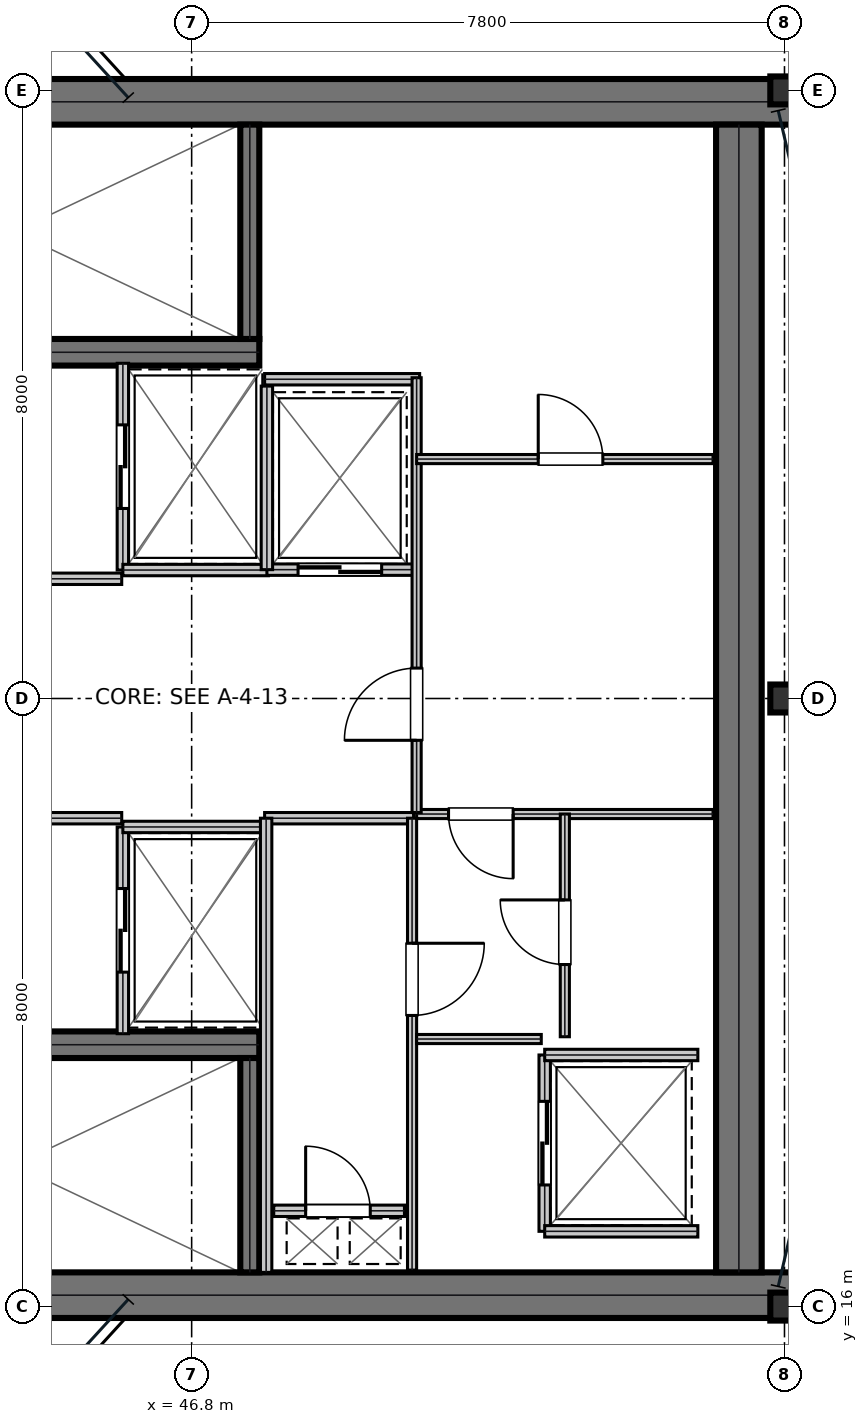
"""IFC4 building model, lengths in metres.
Left out: names, types, materials, properties, quantities, classifications, styles, units other than length and angle.
Written with IfcOpenShell. Run it as: python <this file> out.ifc"""

import sys

from ifc_helpers import new_model, si_unit, direction, frame, frame_2d, origin, origin_2d, place, context, subcontext, project, spatial, rectangle, i_section, extrude, element, fill, save


model = new_model("IFC4")
c1 = context("Model", 3, precision=1e-05, world=origin(), true_north=direction((0.0, 1.0)))
c2 = subcontext(c1, "Body", "Model", "MODEL_VIEW")
j1 = project(units=[si_unit("LENGTHUNIT", "METRE"), si_unit("PLANEANGLEUNIT", "RADIAN")], contexts=[c1])
p1 = place(None, origin())
s1 = spatial("IfcSite", under=j1, at=p1, CompositionType="ELEMENT")
p2 = place(p1, origin())
s2 = spatial("IfcBuilding", under=s1, at=p2, CompositionType="ELEMENT")
p3 = place(p2, frame((0.0, 0.0, 287.1)))
s3 = spatial("IfcBuildingStorey", under=s2, at=p3, CompositionType="ELEMENT", Elevation=287.1)
for number, where, z_axis, x_axis in (
    (1, (38.8, 31.85, 0.0), (0.0, 0.0, 1.0), (1.0, 0.0, 0.0)),
    (2, (38.8, 16.15, 0.0), (0.0, 0.0, 1.0), (1.0, 0.0, 0.0)),
):
    element("IfcWall", number, at=place(p3, frame(where, z_axis=z_axis, x_axis=x_axis)), inside=s3, PredefinedType="SHEAR", context=c2, shape_type="SweptSolid", body=[
        extrude(rectangle(XDim=16.0, YDim=0.6, at=frame_2d((8.0, 0.0))), origin(), (0.0, 0.0, 1.0), 3.81),
    ])
p4 = place(p3, frame((54.0, 16.45, 0.0), z_axis=(0.0, 0.0, 1.0), x_axis=(0.0, 1.0, 0.0)))
e3 = element("IfcWall", 3, at=p4, inside=s3, PredefinedType="SHEAR", context=c2, shape_type="SweptSolid", body=[
    extrude(rectangle(XDim=15.1, YDim=0.6, at=frame_2d((7.55, 0.0))), origin(), (0.0, 0.0, 1.0), 3.81),
])
p5 = place(p3, frame((39.98, 28.555, 0.0), z_axis=(0.0, 0.0, 1.0), x_axis=(1.0, 0.0, 0.0)))
e4 = element("IfcWall", 4, at=p5, inside=s3, PredefinedType="SHEAR", context=c2, shape_type="SweptSolid", body=[
    extrude(rectangle(XDim=7.71, YDim=0.35, at=frame_2d((3.855, 0.0))), origin(), (0.0, 0.0, 1.0), 3.81),
])
p6 = place(p5, frame((0.25, 0.0, 0.0)))
e5 = element("IfcOpeningElement", 5, at=p6, cuts=e4, PredefinedType="OPENING", context=c2, shape_type="SweptSolid", body=[
    extrude(rectangle(XDim=1.1, YDim=2.15, at=frame_2d((0.55, 1.075))), frame((0.0, 0.185, 0.0), z_axis=(0.0, -1.0, 0.0), x_axis=(1.0, 0.0, 0.0)), (0.0, 0.0, 1.0), 0.37),
])
p7 = place(p3, frame((39.98, 19.445, 0.0), z_axis=(0.0, 0.0, 1.0), x_axis=(1.0, 0.0, 0.0)))
e6 = element("IfcWall", 6, at=p7, inside=s3, PredefinedType="SHEAR", context=c2, shape_type="SweptSolid", body=[
    extrude(rectangle(XDim=7.71, YDim=0.35, at=frame_2d((3.855, 0.0))), origin(), (0.0, 0.0, 1.0), 3.81),
])
p8 = place(p7, frame((0.25, 0.0, 0.0)))
e7 = element("IfcOpeningElement", 7, at=p8, cuts=e6, PredefinedType="OPENING", context=c2, shape_type="SweptSolid", body=[
    extrude(rectangle(XDim=1.1, YDim=2.15, at=frame_2d((0.55, 1.075))), frame((0.0, 0.185, 0.0), z_axis=(0.0, -1.0, 0.0), x_axis=(1.0, 0.0, 0.0)), (0.0, 0.0, 1.0), 0.37),
])
for number, where, z_axis, x_axis in (
    (8, (47.565, 28.73, 0.0), (0.0, 0.0, 1.0), (0.0, 1.0, 0.0)),
    (9, (47.565, 16.45, 0.0), (0.0, 0.0, 1.0), (0.0, 1.0, 0.0)),
):
    element("IfcWall", number, at=place(p3, frame(where, z_axis=z_axis, x_axis=x_axis)), inside=s3, PredefinedType="SHEAR", context=c2, shape_type="SweptSolid", body=[
        extrude(rectangle(XDim=2.82, YDim=0.25, at=frame_2d((1.41, 0.0))), origin(), (0.0, 0.0, 1.0), 3.81),
    ])
for number, where, z_axis, x_axis in (
    (10, (54.6, 16.0, 0.0), (0.0, 0.0, 1.0), (1.0, 0.0, 0.0)),
    (11, (54.6, 24.0, 0.0), (0.0, 0.0, 1.0), (1.0, 0.0, 0.0)),
    (12, (54.6, 32.0, 0.0), (0.0, 0.0, 1.0), (1.0, 0.0, 0.0)),
):
    element("IfcColumn", number, at=place(p3, frame(where, z_axis=z_axis, x_axis=x_axis)), inside=s3, PredefinedType="COLUMN", context=c2, shape_type="SweptSolid", body=[
        extrude(i_section(OverallWidth=0.373, OverallDepth=0.368, WebThickness=0.015, FlangeThickness=0.024, at=origin_2d()), origin(), (0.0, 0.0, 1.0), 4.044),
    ])
p9 = place(p3, frame((39.98, 25.575, 0.0), z_axis=(0.0, 0.0, 1.0), x_axis=(1.0, 0.0, 0.0)))
e13 = element("IfcWall", 13, at=p9, inside=s3, PredefinedType="PARTITIONING", context=c2, shape_type="SweptSolid", body=[
    extrude(rectangle(XDim=5.9, YDim=0.15, at=frame_2d((2.95, 0.0))), origin(), (0.0, 0.0, 1.0), 3.81),
])
p10 = place(p9, frame((2.35, 0.0, 0.0)))
e14 = element("IfcOpeningElement", 14, at=p10, cuts=e13, PredefinedType="OPENING", context=c2, shape_type="SweptSolid", body=[
    extrude(rectangle(XDim=1.05, YDim=2.15, at=frame_2d((0.525, 1.075))), frame((0.0, 0.085, 0.0), z_axis=(0.0, -1.0, 0.0), x_axis=(1.0, 0.0, 0.0)), (0.0, 0.0, 1.0), 0.17),
])
p11 = place(p3, frame((39.98, 22.425, 0.0), z_axis=(0.0, 0.0, 1.0), x_axis=(1.0, 0.0, 0.0)))
e15 = element("IfcWall", 15, at=p11, inside=s3, PredefinedType="PARTITIONING", context=c2, shape_type="SweptSolid", body=[
    extrude(rectangle(XDim=5.9, YDim=0.15, at=frame_2d((2.95, 0.0))), origin(), (0.0, 0.0, 1.0), 3.81),
])
p12 = place(p11, frame((2.35, 0.0, 0.0)))
e16 = element("IfcOpeningElement", 16, at=p12, cuts=e15, PredefinedType="OPENING", context=c2, shape_type="SweptSolid", body=[
    extrude(rectangle(XDim=1.05, YDim=2.15, at=frame_2d((0.525, 1.075))), frame((0.0, 0.085, 0.0), z_axis=(0.0, -1.0, 0.0), x_axis=(1.0, 0.0, 0.0)), (0.0, 0.0, 1.0), 0.17),
])
p13 = place(p3, frame((45.895, 25.69, 0.0), z_axis=(0.0, 0.0, 1.0), x_axis=(0.0, 1.0, 0.0)))
e17 = element("IfcWall", 17, at=p13, inside=s3, PredefinedType="PARTITIONING", context=c2, shape_type="SweptSolid", body=[
    extrude(rectangle(XDim=2.72, YDim=0.15, at=frame_2d((1.36, 0.0))), origin(), (0.0, 0.0, 1.0), 3.81),
])
p14 = place(p13, frame((0.81, 0.0, 0.0)))
e18 = element("IfcOpeningElement", 18, at=p14, cuts=e17, PredefinedType="OPENING", context=c2, shape_type="SweptSolid", body=[
    extrude(rectangle(XDim=1.1, YDim=2.15, at=frame_2d((0.55, 1.075))), frame((0.0, 0.085, 0.0), z_axis=(0.0, -1.0, 0.0), x_axis=(1.0, 0.0, 0.0)), (0.0, 0.0, 1.0), 0.17),
])
p15 = place(p3, frame((45.895, 25.69, 0.0), z_axis=(0.0, 0.0, 1.0), x_axis=(1.0, 0.0, 0.0)))
e19 = element("IfcWall", 19, at=p15, inside=s3, PredefinedType="PARTITIONING", context=c2, shape_type="SweptSolid", body=[
    extrude(rectangle(XDim=1.915, YDim=0.15, at=frame_2d((0.958, 0.0))), origin(), (0.0, 0.0, 1.0), 3.81),
])
p16 = place(p3, frame((45.895, 19.59, 0.0), z_axis=(0.0, 0.0, 1.0), x_axis=(0.0, 1.0, 0.0)))
e20 = element("IfcWall", 20, at=p16, inside=s3, PredefinedType="PARTITIONING", context=c2, shape_type="SweptSolid", body=[
    extrude(rectangle(XDim=2.72, YDim=0.15, at=frame_2d((1.36, 0.0))), origin(), (0.0, 0.0, 1.0), 3.81),
])
p17 = place(p16, frame((0.81, 0.0, 0.0)))
e21 = element("IfcOpeningElement", 21, at=p17, cuts=e20, PredefinedType="OPENING", context=c2, shape_type="SweptSolid", body=[
    extrude(rectangle(XDim=1.1, YDim=2.15, at=frame_2d((0.55, 1.075))), frame((0.0, 0.085, 0.0), z_axis=(0.0, -1.0, 0.0), x_axis=(1.0, 0.0, 0.0)), (0.0, 0.0, 1.0), 0.17),
])
p18 = place(p3, frame((45.895, 22.31, 0.0), z_axis=(0.0, 0.0, 1.0), x_axis=(1.0, 0.0, 0.0)))
e22 = element("IfcWall", 22, at=p18, inside=s3, PredefinedType="PARTITIONING", context=c2, shape_type="SweptSolid", body=[
    extrude(rectangle(XDim=1.915, YDim=0.15, at=frame_2d((0.958, 0.0))), origin(), (0.0, 0.0, 1.0), 3.81),
])
p19 = place(p3, frame((47.79, 25.695, 0.0), z_axis=(0.0, 0.0, 1.0), x_axis=(1.0, 0.0, 0.0)))
e23 = element("IfcWall", 23, at=p19, inside=s3, PredefinedType="PARTITIONING", context=c2, shape_type="SweptSolid", body=[
    extrude(rectangle(XDim=1.92, YDim=0.15, at=frame_2d((0.96, 0.0))), origin(), (0.0, 0.0, 1.0), 3.81),
])
p20 = place(p19, frame((0.41, 0.0, 0.0)))
e24 = element("IfcOpeningElement", 24, at=p20, cuts=e23, PredefinedType="OPENING", context=c2, shape_type="SweptSolid", body=[
    extrude(rectangle(XDim=1.1, YDim=2.15, at=frame_2d((0.55, 1.075))), frame((0.0, 0.085, 0.0), z_axis=(0.0, -1.0, 0.0), x_axis=(1.0, 0.0, 0.0)), (0.0, 0.0, 1.0), 0.17),
])
p21 = place(p3, frame((47.79, 25.695, 0.0), z_axis=(0.0, 0.0, 1.0), x_axis=(0.0, 1.0, 0.0)))
e25 = element("IfcWall", 25, at=p21, inside=s3, PredefinedType="PARTITIONING", context=c2, shape_type="SweptSolid", body=[
    extrude(rectangle(XDim=2.415, YDim=0.15, at=frame_2d((1.208, 0.0))), origin(), (0.0, 0.0, 1.0), 3.81),
])
p22 = place(p3, frame((51.445, 16.99, 0.0), z_axis=(0.0, 0.0, 1.0), x_axis=(0.0, 1.0, 0.0)))
e26 = element("IfcWall", 26, at=p22, inside=s3, PredefinedType="PARTITIONING", context=c2, shape_type="SweptSolid", body=[
    extrude(rectangle(XDim=2.32, YDim=0.15, at=frame_2d((1.16, 0.0))), origin(), (0.0, 0.0, 1.0), 3.81),
])
p23 = place(p22, frame((0.61, 0.0, 0.0)))
e27 = element("IfcOpeningElement", 27, at=p23, cuts=e26, PredefinedType="OPENING", context=c2, shape_type="SweptSolid", body=[
    extrude(rectangle(XDim=1.1, YDim=2.15, at=frame_2d((0.55, 1.075))), frame((0.0, 0.085, 0.0), z_axis=(0.0, -1.0, 0.0), x_axis=(1.0, 0.0, 0.0)), (0.0, 0.0, 1.0), 0.17),
])
for number, where, z_axis, x_axis in (
    (28, (51.445, 16.99, 0.0), (0.0, 0.0, 1.0), (1.0, 0.0, 0.0)),
    (29, (51.445, 19.31, 0.0), (0.0, 0.0, 1.0), (1.0, 0.0, 0.0)),
):
    element("IfcWall", number, at=place(p3, frame(where, z_axis=z_axis, x_axis=x_axis)), inside=s3, PredefinedType="PARTITIONING", context=c2, shape_type="SweptSolid", body=[
        extrude(rectangle(XDim=2.015, YDim=0.15, at=frame_2d((1.007, 0.0))), origin(), (0.0, 0.0, 1.0), 3.81),
    ])
p24 = place(p3, frame((47.88, 17.26, 0.0), z_axis=(0.0, 0.0, 1.0), x_axis=(1.0, 0.0, 0.0)))
e30 = element("IfcWall", 30, at=p24, inside=s3, PredefinedType="PARTITIONING", context=c2, shape_type="SweptSolid", body=[
    extrude(rectangle(XDim=1.72, YDim=0.15, at=frame_2d((0.86, 0.0))), origin(), (0.0, 0.0, 1.0), 3.81),
])
p25 = place(p24, frame((0.42, 0.0, 0.0)))
e31 = element("IfcOpeningElement", 31, at=p25, cuts=e30, PredefinedType="OPENING", context=c2, shape_type="SweptSolid", body=[
    extrude(rectangle(XDim=0.85, YDim=2.15, at=frame_2d((0.425, 1.075))), frame((0.0, 0.085, 0.0), z_axis=(0.0, -1.0, 0.0), x_axis=(1.0, 0.0, 0.0)), (0.0, 0.0, 1.0), 0.17),
])
p26 = place(p3, frame((47.76, 22.425, 0.0), z_axis=(0.0, 0.0, 1.0), x_axis=(1.0, 0.0, 0.0)))
e32 = element("IfcWall", 32, at=p26, inside=s3, PredefinedType="PARTITIONING", context=c2, shape_type="SweptSolid", body=[
    extrude(rectangle(XDim=1.96, YDim=0.15, at=frame_2d((0.98, 0.0))), origin(), (0.0, 0.0, 1.0), 3.81),
])
p27 = place(p3, frame((47.78, 16.45, 0.0), z_axis=(0.0, 0.0, 1.0), x_axis=(0.0, 1.0, 0.0)))
e33 = element("IfcWall", 33, at=p27, inside=s3, PredefinedType="PARTITIONING", context=c2, shape_type="SweptSolid", body=[
    extrude(rectangle(XDim=5.975, YDim=0.15, at=frame_2d((2.988, 0.0))), origin(), (0.0, 0.0, 1.0), 3.81),
])
p28 = place(p3, frame((49.7, 16.48, 0.0), z_axis=(0.0, 0.0, 1.0), x_axis=(0.0, 1.0, 0.0)))
e34 = element("IfcWall", 34, at=p28, inside=s3, PredefinedType="PARTITIONING", context=c2, shape_type="SweptSolid", body=[
    extrude(rectangle(XDim=5.945, YDim=0.12, at=frame_2d((2.973, 0.0))), origin(), (0.0, 0.0, 1.0), 3.81),
])
p29 = place(p28, frame((3.35, 0.0, 0.0)))
e35 = element("IfcOpeningElement", 35, at=p29, cuts=e34, PredefinedType="OPENING", context=c2, shape_type="SweptSolid", body=[
    extrude(rectangle(XDim=0.95, YDim=2.15, at=frame_2d((0.475, 1.075))), frame((0.0, 0.07, 0.0), z_axis=(0.0, -1.0, 0.0), x_axis=(1.0, 0.0, 0.0)), (0.0, 0.0, 1.0), 0.14),
])
p30 = place(p3, frame((49.76, 22.48, 0.0), z_axis=(0.0, 0.0, 1.0), x_axis=(1.0, 0.0, 0.0)))
e36 = element("IfcWall", 36, at=p30, inside=s3, PredefinedType="PARTITIONING", context=c2, shape_type="SweptSolid", body=[
    extrude(rectangle(XDim=3.9, YDim=0.12, at=frame_2d((1.95, 0.0))), origin(), (0.0, 0.0, 1.0), 3.81),
])
p31 = place(p30, frame((0.42, 0.0, 0.0)))
e37 = element("IfcOpeningElement", 37, at=p31, cuts=e36, PredefinedType="OPENING", context=c2, shape_type="SweptSolid", body=[
    extrude(rectangle(XDim=0.85, YDim=2.15, at=frame_2d((0.425, 1.075))), frame((0.0, 0.07, 0.0), z_axis=(0.0, -1.0, 0.0), x_axis=(1.0, 0.0, 0.0)), (0.0, 0.0, 1.0), 0.14),
])
p32 = place(p3, frame((51.71, 19.55, 0.0), z_axis=(0.0, 0.0, 1.0), x_axis=(0.0, 1.0, 0.0)))
e38 = element("IfcWall", 38, at=p32, inside=s3, PredefinedType="PARTITIONING", context=c2, shape_type="SweptSolid", body=[
    extrude(rectangle(XDim=2.93, YDim=0.12, at=frame_2d((1.465, 0.0))), origin(), (0.0, 0.0, 1.0), 3.81),
])
p33 = place(p32, frame((0.95, 0.0, 0.0)))
e39 = element("IfcOpeningElement", 39, at=p33, cuts=e38, PredefinedType="OPENING", context=c2, shape_type="SweptSolid", body=[
    extrude(rectangle(XDim=0.85, YDim=2.15, at=frame_2d((0.425, 1.075))), frame((0.0, 0.07, 0.0), z_axis=(0.0, -1.0, 0.0), x_axis=(1.0, 0.0, 0.0)), (0.0, 0.0, 1.0), 0.14),
])
p34 = place(p3, frame((49.76, 19.52, 0.0), z_axis=(0.0, 0.0, 1.0), x_axis=(1.0, 0.0, 0.0)))
e40 = element("IfcWall", 40, at=p34, inside=s3, PredefinedType="PARTITIONING", context=c2, shape_type="SweptSolid", body=[
    extrude(rectangle(XDim=1.64, YDim=0.12, at=frame_2d((0.82, 0.0))), origin(), (0.0, 0.0, 1.0), 3.81),
])
p35 = place(p3, frame((47.76, 28.2, 0.0), z_axis=(0.0, 0.0, 1.0), x_axis=(1.0, 0.0, 0.0)))
e41 = element("IfcWall", 41, at=p35, inside=s3, PredefinedType="PARTITIONING", context=c2, shape_type="SweptSolid", body=[
    extrude(rectangle(XDim=2.04, YDim=0.15, at=frame_2d((1.02, 0.0))), origin(), (0.0, 0.0, 1.0), 3.81),
])
p36 = place(p3, frame((49.76, 22.5, 0.0), z_axis=(0.0, 0.0, 1.0), x_axis=(0.0, 1.0, 0.0)))
e42 = element("IfcWall", 42, at=p36, inside=s3, PredefinedType="PARTITIONING", context=c2, shape_type="SweptSolid", body=[
    extrude(rectangle(XDim=5.72, YDim=0.12, at=frame_2d((2.86, 0.0))), origin(), (0.0, 0.0, 1.0), 3.81),
])
p37 = place(p36, frame((0.95, 0.0, 0.0)))
e43 = element("IfcOpeningElement", 43, at=p37, cuts=e42, PredefinedType="OPENING", context=c2, shape_type="SweptSolid", body=[
    extrude(rectangle(XDim=0.95, YDim=2.15, at=frame_2d((0.475, 1.075))), frame((0.0, 0.07, 0.0), z_axis=(0.0, -1.0, 0.0), x_axis=(1.0, 0.0, 0.0)), (0.0, 0.0, 1.0), 0.14),
])
p38 = place(p3, frame((49.76, 27.15, 0.0), z_axis=(0.0, 0.0, 1.0), x_axis=(1.0, 0.0, 0.0)))
e44 = element("IfcWall", 44, at=p38, inside=s3, PredefinedType="PARTITIONING", context=c2, shape_type="SweptSolid", body=[
    extrude(rectangle(XDim=3.9, YDim=0.12, at=frame_2d((1.95, 0.0))), origin(), (0.0, 0.0, 1.0), 3.81),
])
p39 = place(p38, frame((1.6, 0.0, 0.0)))
e45 = element("IfcOpeningElement", 45, at=p39, cuts=e44, PredefinedType="OPENING", context=c2, shape_type="SweptSolid", body=[
    extrude(rectangle(XDim=0.85, YDim=2.15, at=frame_2d((0.425, 1.075))), frame((0.0, 0.07, 0.0), z_axis=(0.0, -1.0, 0.0), x_axis=(1.0, 0.0, 0.0)), (0.0, 0.0, 1.0), 0.14),
])
p40 = place(p14, frame((1.1, 0.0, 0.0), z_axis=(0.0, 0.0, 1.0), x_axis=(-1.0, 0.0, 0.0)))
e46 = element("IfcDoor", 46, at=p40, inside=s3, OperationType="DOUBLE_DOOR_SLIDING", PredefinedType="DOOR", context=c2, shape_type="SweptSolid", body=[
    extrude(rectangle(XDim=1.1, YDim=2.15, at=frame_2d((0.55, 1.075))), frame((0.0, 0.025, 0.0), z_axis=(0.0, -1.0, 0.0), x_axis=(1.0, 0.0, 0.0)), (0.0, 0.0, 1.0), 0.05),
])
fill(e18, e46)
p41 = place(p17, frame((1.1, 0.0, 0.0), z_axis=(0.0, 0.0, 1.0), x_axis=(-1.0, 0.0, 0.0)))
e47 = element("IfcDoor", 47, at=p41, inside=s3, OperationType="DOUBLE_DOOR_SLIDING", PredefinedType="DOOR", context=c2, shape_type="SweptSolid", body=[
    extrude(rectangle(XDim=1.1, YDim=2.15, at=frame_2d((0.55, 1.075))), frame((0.0, 0.025, 0.0), z_axis=(0.0, -1.0, 0.0), x_axis=(1.0, 0.0, 0.0)), (0.0, 0.0, 1.0), 0.05),
])
fill(e21, e47)
p42 = place(p20, frame((1.1, 0.0, 0.0), z_axis=(0.0, 0.0, 1.0), x_axis=(-1.0, 0.0, 0.0)))
e48 = element("IfcDoor", 48, at=p42, inside=s3, OperationType="DOUBLE_DOOR_SLIDING", PredefinedType="DOOR", context=c2, shape_type="SweptSolid", body=[
    extrude(rectangle(XDim=1.1, YDim=2.15, at=frame_2d((0.55, 1.075))), frame((0.0, 0.025, 0.0), z_axis=(0.0, -1.0, 0.0), x_axis=(1.0, 0.0, 0.0)), (0.0, 0.0, 1.0), 0.05),
])
fill(e24, e48)
p43 = place(p23, frame((1.1, 0.0, 0.0), z_axis=(0.0, 0.0, 1.0), x_axis=(-1.0, 0.0, 0.0)))
e49 = element("IfcDoor", 49, at=p43, inside=s3, OperationType="DOUBLE_DOOR_SLIDING", PredefinedType="DOOR", context=c2, shape_type="SweptSolid", body=[
    extrude(rectangle(XDim=1.1, YDim=2.15, at=frame_2d((0.55, 1.075))), frame((0.0, 0.025, 0.0), z_axis=(0.0, -1.0, 0.0), x_axis=(1.0, 0.0, 0.0)), (0.0, 0.0, 1.0), 0.05),
])
fill(e27, e49)
p44 = place(p25, origin())
e50 = element("IfcDoor", 50, at=p44, inside=s3, OperationType="SINGLE_SWING_LEFT", PredefinedType="TRAPDOOR", context=c2, shape_type="SweptSolid", body=[
    extrude(rectangle(XDim=0.85, YDim=2.15, at=frame_2d((0.425, 1.075))), frame((0.0, 0.025, 0.0), z_axis=(0.0, -1.0, 0.0), x_axis=(1.0, 0.0, 0.0)), (0.0, 0.0, 1.0), 0.05),
])
fill(e31, e50)
p45 = place(p29, frame((0.95, 0.0, 0.0), z_axis=(0.0, 0.0, 1.0), x_axis=(-1.0, 0.0, 0.0)))
e51 = element("IfcDoor", 51, at=p45, inside=s3, OperationType="SINGLE_SWING_LEFT", PredefinedType="DOOR", context=c2, shape_type="SweptSolid", body=[
    extrude(rectangle(XDim=0.95, YDim=2.15, at=frame_2d((0.475, 1.075))), frame((0.0, 0.025, 0.0), z_axis=(0.0, -1.0, 0.0), x_axis=(1.0, 0.0, 0.0)), (0.0, 0.0, 1.0), 0.05),
])
fill(e35, e51)
p46 = place(p31, frame((0.85, 0.0, 0.0), z_axis=(0.0, 0.0, 1.0), x_axis=(-1.0, 0.0, 0.0)))
e52 = element("IfcDoor", 52, at=p46, inside=s3, OperationType="SINGLE_SWING_LEFT", PredefinedType="DOOR", context=c2, shape_type="SweptSolid", body=[
    extrude(rectangle(XDim=0.85, YDim=2.15, at=frame_2d((0.425, 1.075))), frame((0.0, 0.025, 0.0), z_axis=(0.0, -1.0, 0.0), x_axis=(1.0, 0.0, 0.0)), (0.0, 0.0, 1.0), 0.05),
])
fill(e37, e52)
p47 = place(p33, origin())
e53 = element("IfcDoor", 53, at=p47, inside=s3, OperationType="SINGLE_SWING_RIGHT", PredefinedType="DOOR", context=c2, shape_type="SweptSolid", body=[
    extrude(rectangle(XDim=0.85, YDim=2.15, at=frame_2d((0.425, 1.075))), frame((0.0, 0.025, 0.0), z_axis=(0.0, -1.0, 0.0), x_axis=(1.0, 0.0, 0.0)), (0.0, 0.0, 1.0), 0.05),
])
fill(e39, e53)
p48 = place(p37, origin())
e54 = element("IfcDoor", 54, at=p48, inside=s3, OperationType="SINGLE_SWING_LEFT", PredefinedType="DOOR", context=c2, shape_type="SweptSolid", body=[
    extrude(rectangle(XDim=0.95, YDim=2.15, at=frame_2d((0.475, 1.075))), frame((0.0, 0.025, 0.0), z_axis=(0.0, -1.0, 0.0), x_axis=(1.0, 0.0, 0.0)), (0.0, 0.0, 1.0), 0.05),
])
fill(e43, e54)
p49 = place(p39, origin())
e55 = element("IfcDoor", 55, at=p49, inside=s3, OperationType="SINGLE_SWING_LEFT", PredefinedType="DOOR", context=c2, shape_type="SweptSolid", body=[
    extrude(rectangle(XDim=0.85, YDim=2.15, at=frame_2d((0.425, 1.075))), frame((0.0, 0.025, 0.0), z_axis=(0.0, -1.0, 0.0), x_axis=(1.0, 0.0, 0.0)), (0.0, 0.0, 1.0), 0.05),
])
fill(e45, e55)
save(model, sys.argv[1])
